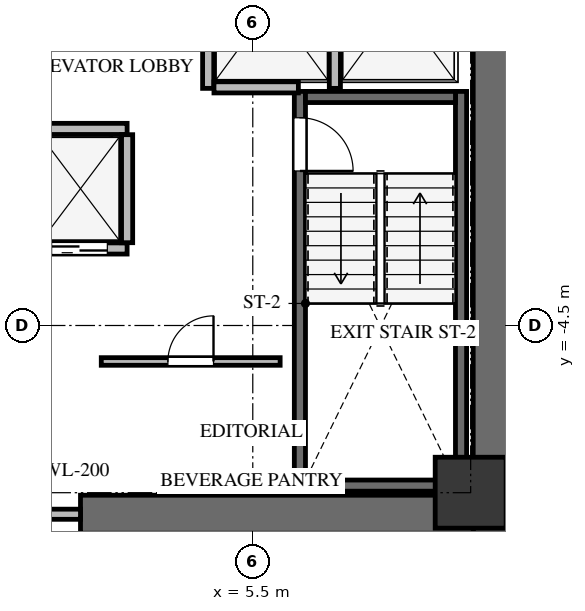
"""IFC4 building model, lengths in metres.
Left out: names, types, materials, properties, quantities, classifications, styles, units other than length and angle.
Written with IfcOpenShell. Run it as: python <this file> out.ifc"""

import sys

from ifc_helpers import new_model, si_unit, direction, frame, frame_2d, origin, origin_2d, place, context, subcontext, project, spatial, rectangle, extrude, source, transform, mapped, element, fill, save


model = new_model("IFC4")
c1 = context("Model", 3, precision=1e-05, world=origin(), true_north=direction((0.0, 1.0)))
c2 = subcontext(c1, "Body", "Model", "MODEL_VIEW")
j1 = project(units=[si_unit("LENGTHUNIT", "METRE"), si_unit("PLANEANGLEUNIT", "RADIAN")], contexts=[c1])
p1 = place(None, origin())
s1 = spatial("IfcSite", under=j1, at=p1, CompositionType="ELEMENT")
p2 = place(p1, origin())
s2 = spatial("IfcBuilding", under=s1, at=p2, CompositionType="ELEMENT")
p3 = place(p2, frame((0.0, 0.0, 114.0)))
s3 = spatial("IfcBuildingStorey", under=s2, at=p3, CompositionType="ELEMENT", Elevation=114.0)
p4 = place(p3, frame((10.225, -8.6, 0.0), z_axis=(0.0, 0.0, 1.0), x_axis=(0.0, 1.0, 0.0)))
e1 = element("IfcWall", 1, at=p4, inside=s3, PredefinedType="SHEAR", context=c2, shape_type="SweptSolid", body=[
    extrude(rectangle(XDim=17.2, YDim=0.75, at=frame_2d((8.6, 0.0))), origin(), (0.0, 0.0, 1.0), 3.3),
])
p5 = place(p3, frame((2.1, -8.225, 0.0), z_axis=(0.0, 0.0, 1.0), x_axis=(1.0, 0.0, 0.0)))
e2 = element("IfcWall", 2, at=p5, inside=s3, PredefinedType="SHEAR", context=c2, shape_type="SweptSolid", body=[
    extrude(rectangle(XDim=7.75, YDim=0.75, at=frame_2d((3.875, 0.0))), origin(), (0.0, 0.0, 1.0), 3.3),
])
p6 = place(p3, frame((9.61, -7.77, -0.24), z_axis=(0.0, 0.0, 1.0), x_axis=(0.0, 1.0, 0.0)))
e3 = element("IfcWall", 3, at=p6, inside=s3, PredefinedType="SHEAR", context=c2, shape_type="SweptSolid", body=[
    extrude(rectangle(XDim=7.89, YDim=0.22, at=frame_2d((3.945, 0.0))), origin(), (0.0, 0.0, 1.0), 3.3),
])
p7 = place(p3, frame((6.43, 0.12, -0.24), z_axis=(0.0, 0.0, 1.0), x_axis=(0.0, -1.0, 0.0)))
e4 = element("IfcWall", 4, at=p7, inside=s3, PredefinedType="SHEAR", context=c2, shape_type="SweptSolid", body=[
    extrude(rectangle(XDim=7.89, YDim=0.22, at=frame_2d((3.945, 0.0))), origin(), (0.0, 0.0, 1.0), 3.3),
])
p8 = place(p7, frame((0.52, 0.0, 0.0)))
e5 = element("IfcOpeningElement", 5, at=p8, cuts=e4, PredefinedType="OPENING", context=c2, shape_type="SweptSolid", body=[
    extrude(rectangle(XDim=1.05, YDim=2.15, at=frame_2d((0.525, 1.075))), frame((0.0, 0.12, 0.0), z_axis=(0.0, -1.0, 0.0), x_axis=(1.0, 0.0, 0.0)), (0.0, 0.0, 1.0), 0.24),
])
for number, where, z_axis, x_axis in (
    (6, (6.54, -7.66, -0.24), (0.0, 0.0, 1.0), (1.0, 0.0, 0.0)),
    (7, (9.5, 0.01, -0.24), (0.0, 0.0, 1.0), (-1.0, 0.0, 0.0)),
):
    element("IfcWall", number, at=place(p3, frame(where, z_axis=z_axis, x_axis=x_axis)), inside=s3, PredefinedType="SHEAR", context=c2, shape_type="SweptSolid", body=[
        extrude(rectangle(XDim=2.96, YDim=0.22, at=frame_2d((1.48, 0.0))), origin(), (0.0, 0.0, 1.0), 3.3),
    ])
m1 = source(origin(), c2, "Body", "SweptSolid", [
    extrude(rectangle(XDim=1.4, YDim=1.4, at=origin_2d()), origin(), (0.0, 0.0, 1.0), 3.3),
])
p9 = place(p3, frame((9.8, -7.8, -0.24), z_axis=(0.0, 0.0, 1.0), x_axis=(1.0, 0.0, 0.0)))
e8 = element("IfcColumn", 8, at=p9, inside=s3, PredefinedType="COLUMN", context=c2, shape_type="MappedRepresentation", body=[
    mapped(m1, transform((0.0, 0.0, 0.0), x_axis=(1.0, 0.0, 0.0), y_axis=(0.0, 1.0, 0.0), z_axis=(0.0, 0.0, 1.0), scale=1.0)),
])
p10 = place(p3, frame((-2.1, -8.225, 0.0), z_axis=(0.0, 0.0, 1.0), x_axis=(1.0, 0.0, 0.0)))
e9 = element("IfcWall", 9, at=p10, inside=s3, PredefinedType="SOLIDWALL", context=c2, shape_type="SweptSolid", body=[
    extrude(rectangle(XDim=4.2, YDim=0.2, at=frame_2d((2.1, 0.0))), origin(), (0.0, 0.0, 1.0), 3.045),
])
p11 = place(p10, frame((1.2, 0.0, 0.0)))
e10 = element("IfcOpeningElement", 10, at=p11, cuts=e9, PredefinedType="OPENING", context=c2, shape_type="SweptSolid", body=[
    extrude(rectangle(XDim=1.8, YDim=2.15, at=frame_2d((0.9, 1.075))), frame((0.0, 0.11, 0.0), z_axis=(0.0, -1.0, 0.0), x_axis=(1.0, 0.0, 0.0)), (0.0, 0.0, 1.0), 0.22),
])
for number, where, z_axis, x_axis in (
    (11, (4.62, 0.18, 0.0), (0.0, 0.0, 1.0), (0.0, 1.0, 0.0)),
    (12, (7.12, 0.18, 0.0), (0.0, 0.0, 1.0), (0.0, 1.0, 0.0)),
):
    element("IfcWall", number, at=place(p3, frame(where, z_axis=z_axis, x_axis=x_axis)), inside=s3, PredefinedType="SOLIDWALL", context=c2, shape_type="SweptSolid", body=[
        extrude(rectangle(XDim=3.186, YDim=0.22, at=frame_2d((1.593, 0.0))), origin(), (0.0, 0.0, 1.0), 3.045),
    ])
p12 = place(p3, frame((4.734, 0.2, 0.0), z_axis=(0.0, 0.0, 1.0), x_axis=(1.0, 0.0, 0.0)))
e13 = element("IfcWall", 13, at=p12, inside=s3, PredefinedType="SOLIDWALL", context=c2, shape_type="SweptSolid", body=[
    extrude(rectangle(XDim=1.666, YDim=0.22, at=frame_2d((0.833, 0.0))), origin(), (0.0, 0.0, 1.0), 3.045),
])
p13 = place(p3, frame((-4.22, -2.98, 0.0), z_axis=(0.0, 0.0, 1.0), x_axis=(1.0, 0.0, 0.0)))
e14 = element("IfcWall", 14, at=p13, inside=s3, PredefinedType="SOLIDWALL", context=c2, shape_type="SweptSolid", body=[
    extrude(rectangle(XDim=7.24, YDim=0.22, at=frame_2d((3.62, 0.0))), origin(), (0.0, 0.0, 1.0), 3.045),
])
p14 = place(p13, frame((0.35, 0.0, 0.0)))
e15 = element("IfcOpeningElement", 15, at=p14, cuts=e14, PredefinedType="OPENING", context=c2, shape_type="SweptSolid", body=[
    extrude(rectangle(XDim=1.1, YDim=2.15, at=frame_2d((0.55, 1.075))), frame((0.0, 0.12, 0.0), z_axis=(0.0, -1.0, 0.0), x_axis=(1.0, 0.0, 0.0)), (0.0, 0.0, 1.0), 0.24),
])
p15 = place(p13, frame((2.15, 0.0, 0.0)))
e16 = element("IfcOpeningElement", 16, at=p15, cuts=e14, PredefinedType="OPENING", context=c2, shape_type="SweptSolid", body=[
    extrude(rectangle(XDim=1.1, YDim=2.15, at=frame_2d((0.55, 1.075))), frame((0.0, 0.12, 0.0), z_axis=(0.0, -1.0, 0.0), x_axis=(1.0, 0.0, 0.0)), (0.0, 0.0, 1.0), 0.24),
])
p16 = place(p13, frame((3.95, 0.0, 0.0)))
e17 = element("IfcOpeningElement", 17, at=p16, cuts=e14, PredefinedType="OPENING", context=c2, shape_type="SweptSolid", body=[
    extrude(rectangle(XDim=1.1, YDim=2.15, at=frame_2d((0.55, 1.075))), frame((0.0, 0.12, 0.0), z_axis=(0.0, -1.0, 0.0), x_axis=(1.0, 0.0, 0.0)), (0.0, 0.0, 1.0), 0.24),
])
p17 = place(p13, frame((5.75, 0.0, 0.0)))
e18 = element("IfcOpeningElement", 18, at=p17, cuts=e14, PredefinedType="OPENING", context=c2, shape_type="SweptSolid", body=[
    extrude(rectangle(XDim=1.1, YDim=2.15, at=frame_2d((0.55, 1.075))), frame((0.0, 0.12, 0.0), z_axis=(0.0, -1.0, 0.0), x_axis=(1.0, 0.0, 0.0)), (0.0, 0.0, 1.0), 0.24),
])
p18 = place(p3, frame((-4.22, -0.62, 0.0), z_axis=(0.0, 0.0, 1.0), x_axis=(1.0, 0.0, 0.0)))
e19 = element("IfcWall", 19, at=p18, inside=s3, PredefinedType="SOLIDWALL", context=c2, shape_type="SweptSolid", body=[
    extrude(rectangle(XDim=7.24, YDim=0.22, at=frame_2d((3.62, 0.0))), origin(), (0.0, 0.0, 1.0), 3.045),
])
p19 = place(p3, frame((3.02, -2.866, 0.0), z_axis=(0.0, 0.0, 1.0), x_axis=(0.0, 1.0, 0.0)))
e20 = element("IfcWall", 20, at=p19, inside=s3, PredefinedType="SOLIDWALL", context=c2, shape_type="SweptSolid", body=[
    extrude(rectangle(XDim=2.132, YDim=0.22, at=frame_2d((1.066, 0.0))), origin(), (0.0, 0.0, 1.0), 3.045),
])
p20 = place(p3, frame((2.51, -5.21, 0.0), z_axis=(0.0, 0.0, 1.0), x_axis=(1.0, 0.0, 0.0)))
e21 = element("IfcWall", 21, at=p20, inside=s3, PredefinedType="PARTITIONING", context=c2, shape_type="SweptSolid", body=[
    extrude(rectangle(XDim=3.53, YDim=0.15, at=frame_2d((1.765, 0.0))), origin(), (0.0, 0.0, 1.0), 3.045),
])
p21 = place(p20, frame((1.315, 0.0, 0.0)))
e22 = element("IfcOpeningElement", 22, at=p21, cuts=e21, PredefinedType="OPENING", context=c2, shape_type="SweptSolid", body=[
    extrude(rectangle(XDim=0.9, YDim=2.05, at=frame_2d((0.45, 1.025))), frame((0.0, 0.085, 0.0), z_axis=(0.0, -1.0, 0.0), x_axis=(1.0, 0.0, 0.0)), (0.0, 0.0, 1.0), 0.17),
])
m2 = source(origin(), c2, "Body", "SweptSolid", [
    extrude(rectangle(XDim=1.05, YDim=2.15, at=frame_2d((0.525, 1.075))), frame((0.0, 0.025, 0.0), z_axis=(0.0, -1.0, 0.0), x_axis=(1.0, 0.0, 0.0)), (0.0, 0.0, 1.0), 0.05),
])
p22 = place(p8, origin())
e23 = element("IfcDoor", 23, at=p22, inside=s3, OperationType="SINGLE_SWING_RIGHT", PredefinedType="DOOR", context=c2, shape_type="MappedRepresentation", body=[
    mapped(m2, transform((0.0, 0.0, 0.0), x_axis=(1.0, 0.0, 0.0), y_axis=(0.0, 1.0, 0.0), z_axis=(0.0, 0.0, 1.0), scale=1.0)),
])
fill(e5, e23)
m3 = source(origin(), c2, "Body", "SweptSolid", [
    extrude(rectangle(XDim=1.1, YDim=2.15, at=frame_2d((0.55, 1.075))), frame((0.0, 0.025, 0.0), z_axis=(0.0, -1.0, 0.0), x_axis=(1.0, 0.0, 0.0)), (0.0, 0.0, 1.0), 0.05),
])
p23 = place(p17, origin())
e24 = element("IfcDoor", 24, at=p23, inside=s3, OperationType="DOUBLE_DOOR_SLIDING", PredefinedType="DOOR", context=c2, shape_type="MappedRepresentation", body=[
    mapped(m3, transform((0.0, 0.0, 0.0), x_axis=(1.0, 0.0, 0.0), y_axis=(0.0, 1.0, 0.0), z_axis=(0.0, 0.0, 1.0), scale=1.0)),
])
fill(e18, e24)
m4 = source(origin(), c2, "Body", "SweptSolid", [
    extrude(rectangle(XDim=0.9, YDim=2.05, at=frame_2d((0.45, 1.025))), frame((0.0, 0.025, 0.0), z_axis=(0.0, -1.0, 0.0), x_axis=(1.0, 0.0, 0.0)), (0.0, 0.0, 1.0), 0.05),
])
p24 = place(p21, origin())
e25 = element("IfcDoor", 25, at=p24, inside=s3, OperationType="SINGLE_SWING_RIGHT", PredefinedType="DOOR", context=c2, shape_type="MappedRepresentation", body=[
    mapped(m4, transform((0.0, 0.0, 0.0), x_axis=(1.0, 0.0, 0.0), y_axis=(0.0, 1.0, 0.0), z_axis=(0.0, 0.0, 1.0), scale=1.0)),
])
fill(e22, e25)
save(model, sys.argv[1])
